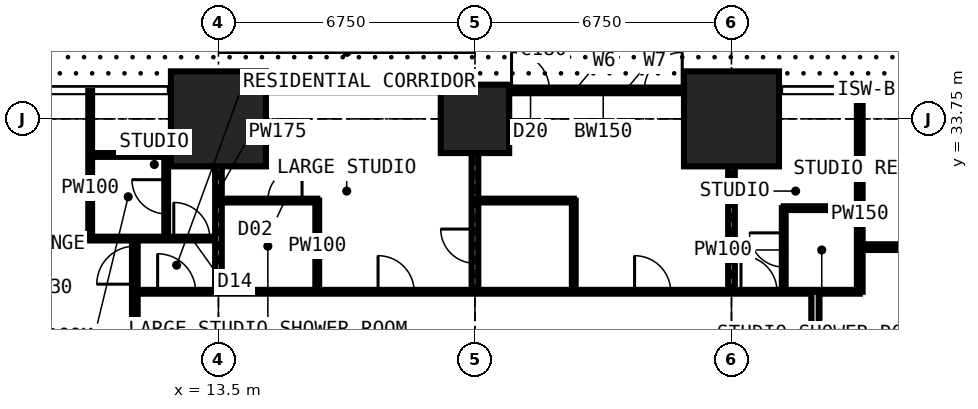
"""IFC4 building model, lengths in metres.
Left out: names, types, materials, properties, quantities, classifications, styles, units other than length and angle.
Written with IfcOpenShell. Run it as: python <this file> out.ifc"""

import sys

from ifc_helpers import new_model, si_unit, direction, frame, frame_2d, origin, origin_2d, place, context, subcontext, project, spatial, rectangle, extrude, element, fill, save


model = new_model("IFC4")
c1 = context("Model", 3, precision=1e-05, world=origin(), true_north=direction((0.0, 1.0)))
c2 = subcontext(c1, "Body", "Model", "MODEL_VIEW")
j1 = project(units=[si_unit("LENGTHUNIT", "METRE"), si_unit("PLANEANGLEUNIT", "RADIAN")], contexts=[c1])
p1 = place(None, origin())
s1 = spatial("IfcSite", under=j1, at=p1, CompositionType="ELEMENT")
p2 = place(p1, origin())
s2 = spatial("IfcBuilding", under=s1, at=p2, CompositionType="ELEMENT")
p3 = place(p2, frame((0.0, 0.0, 80.1)))
s3 = spatial("IfcBuildingStorey", under=s2, at=p3, CompositionType="ELEMENT", Elevation=80.1)
p4 = place(p3, frame((13.5, 33.75, 0.0), z_axis=(0.0, 0.0, 1.0), x_axis=(1.0, 0.0, 0.0)))
e1 = element("IfcColumn", 1, at=p4, inside=s3, PredefinedType="COLUMN", context=c2, shape_type="SweptSolid", body=[
    extrude(rectangle(XDim=2.5, YDim=2.5, at=origin_2d()), origin(), (0.0, 0.0, 1.0), 3.6),
])
p5 = place(p3, frame((20.25, 33.75, 0.0), z_axis=(0.0, 0.0, 1.0), x_axis=(1.0, 0.0, 0.0)))
e2 = element("IfcColumn", 2, at=p5, inside=s3, PredefinedType="COLUMN", context=c2, shape_type="SweptSolid", body=[
    extrude(rectangle(XDim=1.8, YDim=1.8, at=origin_2d()), origin(), (0.0, 0.0, 1.0), 3.6),
])
p6 = place(p3, frame((27.0, 33.75, 0.0), z_axis=(0.0, 0.0, 1.0), x_axis=(1.0, 0.0, 0.0)))
e3 = element("IfcColumn", 3, at=p6, inside=s3, PredefinedType="COLUMN", context=c2, shape_type="SweptSolid", body=[
    extrude(rectangle(XDim=2.5, YDim=2.5, at=origin_2d()), origin(), (0.0, 0.0, 1.0), 3.6),
])
p7 = place(p3, frame((20.25, 34.5, 0.0), z_axis=(0.0, 0.0, 1.0), x_axis=(1.0, 0.0, 0.0)))
e4 = element("IfcWall", 4, at=p7, inside=s3, PredefinedType="SOLIDWALL", context=c2, shape_type="SweptSolid", body=[
    extrude(rectangle(XDim=6.75, YDim=0.15, at=frame_2d((3.375, 0.0))), origin(), (0.0, 0.0, 1.0), 3.375),
])
p8 = place(p7, frame((0.962, 0.0, 0.0)))
e5 = element("IfcOpeningElement", 5, at=p8, cuts=e4, PredefinedType="OPENING", context=c2, shape_type="SweptSolid", body=[
    extrude(rectangle(XDim=1.0, YDim=2.2, at=frame_2d((0.5, 1.1))), frame((0.0, 0.085, 0.0), z_axis=(0.0, -1.0, 0.0), x_axis=(1.0, 0.0, 0.0)), (0.0, 0.0, 1.0), 0.17),
])
p9 = place(p7, frame((2.025, 0.0, 0.9)))
e6 = element("IfcOpeningElement", 6, at=p9, cuts=e4, PredefinedType="OPENING", context=c2, shape_type="SweptSolid", body=[
    extrude(rectangle(XDim=1.2, YDim=1.8, at=frame_2d((0.6, 0.9))), frame((0.0, 0.085, 0.0), z_axis=(0.0, -1.0, 0.0), x_axis=(1.0, 0.0, 0.0)), (0.0, 0.0, 1.0), 0.17),
])
p10 = place(p7, frame((4.454, 0.0, 0.0)))
e7 = element("IfcOpeningElement", 7, at=p10, cuts=e4, PredefinedType="OPENING", context=c2, shape_type="SweptSolid", body=[
    extrude(rectangle(XDim=1.0, YDim=2.2, at=frame_2d((0.5, 1.1))), frame((0.0, 0.085, 0.0), z_axis=(0.0, -1.0, 0.0), x_axis=(1.0, 0.0, 0.0)), (0.0, 0.0, 1.0), 0.17),
])
p11 = place(p7, frame((3.508, 0.0, 0.9)))
e8 = element("IfcOpeningElement", 8, at=p11, cuts=e4, PredefinedType="OPENING", context=c2, shape_type="SweptSolid", body=[
    extrude(rectangle(XDim=0.9, YDim=1.8, at=frame_2d((0.45, 0.9))), frame((0.0, 0.085, 0.0), z_axis=(0.0, -1.0, 0.0), x_axis=(1.0, 0.0, 0.0)), (0.0, 0.0, 1.0), 0.17),
])
p12 = place(p3, frame((10.125, 30.6, 0.0), z_axis=(0.0, 0.0, 1.0), x_axis=(0.0, 1.0, 0.0)))
e9 = element("IfcWall", 9, at=p12, inside=s3, PredefinedType="PARTITIONING", context=c2, shape_type="SweptSolid", body=[
    extrude(rectangle(XDim=3.884, YDim=0.1, at=frame_2d((1.942, 0.0))), origin(), (0.0, 0.0, 1.0), 3.375),
])
p13 = place(p3, frame((10.125, 30.6, 0.0), z_axis=(0.0, 0.0, 1.0), x_axis=(1.0, 0.0, 0.0)))
e10 = element("IfcWall", 10, at=p13, inside=s3, PredefinedType="PARTITIONING", context=c2, shape_type="SweptSolid", body=[
    extrude(rectangle(XDim=3.375, YDim=0.1, at=frame_2d((1.688, 0.0))), origin(), (0.0, 0.0, 1.0), 3.375),
])
p14 = place(p13, frame((2.2, 0.0, 0.0)))
e11 = element("IfcOpeningElement", 11, at=p14, cuts=e10, PredefinedType="OPENING", context=c2, shape_type="SweptSolid", body=[
    extrude(rectangle(XDim=0.95, YDim=2.2, at=frame_2d((0.475, 1.1))), frame((0.0, 0.06, 0.0), z_axis=(0.0, -1.0, 0.0), x_axis=(1.0, 0.0, 0.0)), (0.0, 0.0, 1.0), 0.12),
])
p15 = place(p3, frame((10.125, 32.8, 0.0), z_axis=(0.0, 0.0, 1.0), x_axis=(1.0, 0.0, 0.0)))
e12 = element("IfcWall", 12, at=p15, inside=s3, PredefinedType="PARTITIONING", context=c2, shape_type="SweptSolid", body=[
    extrude(rectangle(XDim=2.0, YDim=0.1, at=frame_2d((1.0, 0.0))), origin(), (0.0, 0.0, 1.0), 3.375),
])
p16 = place(p3, frame((11.3, 11.3, 0.0), z_axis=(0.0, 0.0, 1.0), x_axis=(0.0, 1.0, 0.0)))
e13 = element("IfcWall", 13, at=p16, inside=s3, PredefinedType="PARTITIONING", context=c2, shape_type="SweptSolid", body=[
    extrude(rectangle(XDim=19.3, YDim=0.15, at=frame_2d((9.65, 0.0))), origin(), (0.0, 0.0, 1.0), 3.375),
])
p17 = place(p16, frame((18.1, 0.0, 0.0)))
e14 = element("IfcOpeningElement", 14, at=p17, cuts=e13, PredefinedType="OPENING", context=c2, shape_type="SweptSolid", body=[
    extrude(rectangle(XDim=1.0, YDim=2.2, at=frame_2d((0.5, 1.1))), frame((0.0, 0.085, 0.0), z_axis=(0.0, -1.0, 0.0), x_axis=(1.0, 0.0, 0.0)), (0.0, 0.0, 1.0), 0.17),
])
p18 = place(p16, frame((10.137, 0.0, 0.0)))
e15 = element("IfcOpeningElement", 15, at=p18, cuts=e13, PredefinedType="OPENING", context=c2, shape_type="SweptSolid", body=[
    extrude(rectangle(XDim=1.0, YDim=2.2, at=frame_2d((0.5, 1.1))), frame((0.0, 0.085, 0.0), z_axis=(0.0, -1.0, 0.0), x_axis=(1.0, 0.0, 0.0)), (0.0, 0.0, 1.0), 0.17),
])
p19 = place(p3, frame((11.3, 29.2, 0.0), z_axis=(0.0, 0.0, 1.0), x_axis=(1.0, 0.0, 0.0)))
e16 = element("IfcWall", 16, at=p19, inside=s3, PredefinedType="PARTITIONING", context=c2, shape_type="SweptSolid", body=[
    extrude(rectangle(XDim=19.075, YDim=0.1, at=frame_2d((9.538, 0.0))), origin(), (0.0, 0.0, 1.0), 3.375),
])
p20 = place(p19, frame((6.4, 0.0, 0.0)))
e17 = element("IfcOpeningElement", 17, at=p20, cuts=e16, PredefinedType="OPENING", context=c2, shape_type="SweptSolid", body=[
    extrude(rectangle(XDim=0.95, YDim=2.2, at=frame_2d((0.475, 1.1))), frame((0.0, 0.06, 0.0), z_axis=(0.0, -1.0, 0.0), x_axis=(1.0, 0.0, 0.0)), (0.0, 0.0, 1.0), 0.12),
])
p21 = place(p19, frame((13.15, 0.0, 0.0)))
e18 = element("IfcOpeningElement", 18, at=p21, cuts=e16, PredefinedType="OPENING", context=c2, shape_type="SweptSolid", body=[
    extrude(rectangle(XDim=0.95, YDim=2.2, at=frame_2d((0.475, 1.1))), frame((0.0, 0.06, 0.0), z_axis=(0.0, -1.0, 0.0), x_axis=(1.0, 0.0, 0.0)), (0.0, 0.0, 1.0), 0.12),
])
p22 = place(p19, frame((15.95, 0.0, 0.0)))
e19 = element("IfcOpeningElement", 19, at=p22, cuts=e16, PredefinedType="OPENING", context=c2, shape_type="SweptSolid", body=[
    extrude(rectangle(XDim=0.95, YDim=2.2, at=frame_2d((0.475, 1.1))), frame((0.0, 0.06, 0.0), z_axis=(0.0, -1.0, 0.0), x_axis=(1.0, 0.0, 0.0)), (0.0, 0.0, 1.0), 0.12),
])
p23 = place(p19, frame((0.6, 0.0, 0.0)))
e20 = element("IfcOpeningElement", 20, at=p23, cuts=e16, PredefinedType="OPENING", context=c2, shape_type="SweptSolid", body=[
    extrude(rectangle(XDim=1.0, YDim=2.2, at=frame_2d((0.5, 1.1))), frame((0.0, 0.06, 0.0), z_axis=(0.0, -1.0, 0.0), x_axis=(1.0, 0.0, 0.0)), (0.0, 0.0, 1.0), 0.12),
])
p24 = place(p3, frame((12.125, 30.6, 0.0), z_axis=(0.0, 0.0, 1.0), x_axis=(0.0, 1.0, 0.0)))
e21 = element("IfcWall", 21, at=p24, inside=s3, PredefinedType="PARTITIONING", context=c2, shape_type="SweptSolid", body=[
    extrude(rectangle(XDim=2.2, YDim=0.1, at=frame_2d((1.1, 0.0))), origin(), (0.0, 0.0, 1.0), 3.375),
])
p25 = place(p24, frame((0.65, 0.0, 0.0)))
e22 = element("IfcOpeningElement", 22, at=p25, cuts=e21, PredefinedType="OPENING", context=c2, shape_type="SweptSolid", body=[
    extrude(rectangle(XDim=0.9, YDim=2.2, at=frame_2d((0.45, 1.1))), frame((0.0, 0.06, 0.0), z_axis=(0.0, -1.0, 0.0), x_axis=(1.0, 0.0, 0.0)), (0.0, 0.0, 1.0), 0.12),
])
p26 = place(p3, frame((13.5, 29.2, 0.0), z_axis=(0.0, 0.0, 1.0), x_axis=(0.0, 1.0, 0.0)))
e23 = element("IfcWall", 23, at=p26, inside=s3, PredefinedType="PARTITIONING", context=c2, shape_type="SweptSolid", body=[
    extrude(rectangle(XDim=5.284, YDim=0.175, at=frame_2d((2.642, 0.0))), origin(), (0.0, 0.0, 1.0), 2.806),
])
p27 = place(p3, frame((13.5, 31.6, 0.0), z_axis=(0.0, 0.0, 1.0), x_axis=(1.0, 0.0, 0.0)))
e24 = element("IfcWall", 24, at=p27, inside=s3, PredefinedType="PARTITIONING", context=c2, shape_type="SweptSolid", body=[
    extrude(rectangle(XDim=2.6, YDim=0.1, at=frame_2d((1.3, 0.0))), origin(), (0.0, 0.0, 1.0), 3.375),
])
p28 = place(p27, frame((1.3, 0.0, 0.0)))
e25 = element("IfcOpeningElement", 25, at=p28, cuts=e24, PredefinedType="OPENING", context=c2, shape_type="SweptSolid", body=[
    extrude(rectangle(XDim=0.9, YDim=2.2, at=frame_2d((0.45, 1.1))), frame((0.0, 0.06, 0.0), z_axis=(0.0, -1.0, 0.0), x_axis=(1.0, 0.0, 0.0)), (0.0, 0.0, 1.0), 0.12),
])
p29 = place(p3, frame((16.1, 29.2, 0.0), z_axis=(0.0, 0.0, 1.0), x_axis=(0.0, 1.0, 0.0)))
e26 = element("IfcWall", 26, at=p29, inside=s3, PredefinedType="PARTITIONING", context=c2, shape_type="SweptSolid", body=[
    extrude(rectangle(XDim=2.4, YDim=0.1, at=frame_2d((1.2, 0.0))), origin(), (0.0, 0.0, 1.0), 3.375),
])
p30 = place(p3, frame((20.25, 29.2, 0.0), z_axis=(0.0, 0.0, 1.0), x_axis=(0.0, 1.0, 0.0)))
e27 = element("IfcWall", 27, at=p30, inside=s3, PredefinedType="PARTITIONING", context=c2, shape_type="SweptSolid", body=[
    extrude(rectangle(XDim=5.284, YDim=0.175, at=frame_2d((2.642, 0.0))), origin(), (0.0, 0.0, 1.0), 2.61),
])
p31 = place(p30, frame((0.75, 0.0, 0.0)))
e28 = element("IfcOpeningElement", 28, at=p31, cuts=e27, PredefinedType="OPENING", context=c2, shape_type="SweptSolid", body=[
    extrude(rectangle(XDim=0.9, YDim=2.2, at=frame_2d((0.45, 1.1))), frame((0.0, 0.097, 0.0), z_axis=(0.0, -1.0, 0.0), x_axis=(1.0, 0.0, 0.0)), (0.0, 0.0, 1.0), 0.195),
])
p32 = place(p3, frame((20.25, 31.6, 0.0), z_axis=(0.0, 0.0, 1.0), x_axis=(1.0, 0.0, 0.0)))
e29 = element("IfcWall", 29, at=p32, inside=s3, PredefinedType="PARTITIONING", context=c2, shape_type="SweptSolid", body=[
    extrude(rectangle(XDim=2.6, YDim=0.1, at=frame_2d((1.3, 0.0))), origin(), (0.0, 0.0, 1.0), 3.375),
])
p33 = place(p3, frame((22.85, 29.2, 0.0), z_axis=(0.0, 0.0, 1.0), x_axis=(0.0, 1.0, 0.0)))
e30 = element("IfcWall", 30, at=p33, inside=s3, PredefinedType="PARTITIONING", context=c2, shape_type="SweptSolid", body=[
    extrude(rectangle(XDim=2.4, YDim=0.1, at=frame_2d((1.2, 0.0))), origin(), (0.0, 0.0, 1.0), 3.375),
])
p34 = place(p3, frame((27.0, 29.2, 0.0), z_axis=(0.0, 0.0, 1.0), x_axis=(0.0, 1.0, 0.0)))
e31 = element("IfcWall", 31, at=p34, inside=s3, PredefinedType="PARTITIONING", context=c2, shape_type="SweptSolid", body=[
    extrude(rectangle(XDim=5.284, YDim=0.175, at=frame_2d((2.642, 0.0))), origin(), (0.0, 0.0, 1.0), 2.61),
])
p35 = place(p3, frame((28.375, 29.2, 0.0), z_axis=(0.0, 0.0, 1.0), x_axis=(0.0, 1.0, 0.0)))
e32 = element("IfcWall", 32, at=p35, inside=s3, PredefinedType="PARTITIONING", context=c2, shape_type="SweptSolid", body=[
    extrude(rectangle(XDim=2.2, YDim=0.1, at=frame_2d((1.1, 0.0))), origin(), (0.0, 0.0, 1.0), 3.375),
])
p36 = place(p35, frame((0.65, 0.0, 0.0)))
e33 = element("IfcOpeningElement", 33, at=p36, cuts=e32, PredefinedType="OPENING", context=c2, shape_type="SweptSolid", body=[
    extrude(rectangle(XDim=0.9, YDim=2.2, at=frame_2d((0.45, 1.1))), frame((0.0, 0.06, 0.0), z_axis=(0.0, -1.0, 0.0), x_axis=(1.0, 0.0, 0.0)), (0.0, 0.0, 1.0), 0.12),
])
p37 = place(p3, frame((28.375, 31.4, 0.0), z_axis=(0.0, 0.0, 1.0), x_axis=(1.0, 0.0, 0.0)))
e34 = element("IfcWall", 34, at=p37, inside=s3, PredefinedType="PARTITIONING", context=c2, shape_type="SweptSolid", body=[
    extrude(rectangle(XDim=2.0, YDim=0.1, at=frame_2d((1.0, 0.0))), origin(), (0.0, 0.0, 1.0), 3.375),
])
p38 = place(p3, frame((29.2, 11.3, 0.0), z_axis=(0.0, 0.0, 1.0), x_axis=(0.0, 1.0, 0.0)))
e35 = element("IfcWall", 35, at=p38, inside=s3, PredefinedType="PARTITIONING", context=c2, shape_type="SweptSolid", body=[
    extrude(rectangle(XDim=17.9, YDim=0.2, at=frame_2d((8.95, 0.0))), origin(), (0.0, 0.0, 1.0), 3.375),
])
p39 = place(p38, frame((8.35, 0.0, 0.0)))
e36 = element("IfcOpeningElement", 36, at=p39, cuts=e35, PredefinedType="OPENING", context=c2, shape_type="SweptSolid", body=[
    extrude(rectangle(XDim=1.2, YDim=2.2, at=frame_2d((0.6, 1.1))), frame((0.0, 0.11, 0.0), z_axis=(0.0, -1.0, 0.0), x_axis=(1.0, 0.0, 0.0)), (0.0, 0.0, 1.0), 0.22),
])
p40 = place(p3, frame((30.375, 29.2, 0.0), z_axis=(0.0, 0.0, 1.0), x_axis=(0.0, 1.0, 0.0)))
e37 = element("IfcWall", 37, at=p40, inside=s3, PredefinedType="PARTITIONING", context=c2, shape_type="SweptSolid", body=[
    extrude(rectangle(XDim=5.284, YDim=0.15, at=frame_2d((2.642, 0.0))), origin(), (0.0, 0.0, 1.0), 3.375),
])
p41 = place(p3, frame((30.375, 30.375, 0.0), z_axis=(0.0, 0.0, 1.0), x_axis=(1.0, 0.0, 0.0)))
e38 = element("IfcWall", 38, at=p41, inside=s3, PredefinedType="PARTITIONING", context=c2, shape_type="SweptSolid", body=[
    extrude(rectangle(XDim=7.35, YDim=0.15, at=frame_2d((3.675, 0.0))), origin(), (0.0, 0.0, 1.0), 2.877),
])
p42 = place(p41, frame((5.125, 0.0, 0.0)))
e39 = element("IfcOpeningElement", 39, at=p42, cuts=e38, PredefinedType="OPENING", context=c2, shape_type="SweptSolid", body=[
    extrude(rectangle(XDim=1.0, YDim=2.2, at=frame_2d((0.5, 1.1))), frame((0.0, 0.085, 0.0), z_axis=(0.0, -1.0, 0.0), x_axis=(1.0, 0.0, 0.0)), (0.0, 0.0, 1.0), 0.17),
])
p43 = place(p8, origin())
e40 = element("IfcDoor", 40, at=p43, inside=s3, OperationType="SINGLE_SWING_LEFT", PredefinedType="DOOR", context=c2, shape_type="SweptSolid", body=[
    extrude(rectangle(XDim=1.0, YDim=2.2, at=frame_2d((0.5, 1.1))), frame((0.0, 0.025, 0.0), z_axis=(0.0, -1.0, 0.0), x_axis=(1.0, 0.0, 0.0)), (0.0, 0.0, 1.0), 0.05),
])
fill(e5, e40)
p44 = place(p9, origin())
e41 = element("IfcWindow", 41, at=p44, inside=s3, PartitioningType="SINGLE_PANEL", PredefinedType="WINDOW", context=c2, shape_type="SweptSolid", body=[
    extrude(rectangle(XDim=1.2, YDim=1.8, at=frame_2d((0.6, 0.9))), frame((0.0, 0.03, 0.0), z_axis=(0.0, -1.0, 0.0), x_axis=(1.0, 0.0, 0.0)), (0.0, 0.0, 1.0), 0.06),
])
fill(e6, e41)
p45 = place(p10, origin())
e42 = element("IfcDoor", 42, at=p45, inside=s3, OperationType="SINGLE_SWING_RIGHT", PredefinedType="DOOR", context=c2, shape_type="SweptSolid", body=[
    extrude(rectangle(XDim=1.0, YDim=2.2, at=frame_2d((0.5, 1.1))), frame((0.0, 0.025, 0.0), z_axis=(0.0, -1.0, 0.0), x_axis=(1.0, 0.0, 0.0)), (0.0, 0.0, 1.0), 0.05),
])
fill(e7, e42)
p46 = place(p11, origin())
e43 = element("IfcWindow", 43, at=p46, inside=s3, PartitioningType="SINGLE_PANEL", PredefinedType="WINDOW", context=c2, shape_type="SweptSolid", body=[
    extrude(rectangle(XDim=0.9, YDim=1.8, at=frame_2d((0.45, 0.9))), frame((0.0, 0.03, 0.0), z_axis=(0.0, -1.0, 0.0), x_axis=(1.0, 0.0, 0.0)), (0.0, 0.0, 1.0), 0.06),
])
fill(e8, e43)
p47 = place(p20, origin())
e44 = element("IfcDoor", 44, at=p47, inside=s3, OperationType="SINGLE_SWING_LEFT", PredefinedType="DOOR", context=c2, shape_type="SweptSolid", body=[
    extrude(rectangle(XDim=0.95, YDim=2.2, at=frame_2d((0.475, 1.1))), frame((0.0, 0.025, 0.0), z_axis=(0.0, -1.0, 0.0), x_axis=(1.0, 0.0, 0.0)), (0.0, 0.0, 1.0), 0.05),
])
fill(e17, e44)
p48 = place(p28, origin())
e45 = element("IfcDoor", 45, at=p48, inside=s3, OperationType="SINGLE_SWING_RIGHT", PredefinedType="DOOR", context=c2, shape_type="SweptSolid", body=[
    extrude(rectangle(XDim=0.9, YDim=2.2, at=frame_2d((0.45, 1.1))), frame((0.0, 0.025, 0.0), z_axis=(0.0, -1.0, 0.0), x_axis=(1.0, 0.0, 0.0)), (0.0, 0.0, 1.0), 0.05),
])
fill(e25, e45)
p49 = place(p21, origin())
e46 = element("IfcDoor", 46, at=p49, inside=s3, OperationType="SINGLE_SWING_LEFT", PredefinedType="DOOR", context=c2, shape_type="SweptSolid", body=[
    extrude(rectangle(XDim=0.95, YDim=2.2, at=frame_2d((0.475, 1.1))), frame((0.0, 0.025, 0.0), z_axis=(0.0, -1.0, 0.0), x_axis=(1.0, 0.0, 0.0)), (0.0, 0.0, 1.0), 0.05),
])
fill(e18, e46)
p50 = place(p31, origin())
e47 = element("IfcDoor", 47, at=p50, inside=s3, OperationType="SINGLE_SWING_RIGHT", PredefinedType="DOOR", context=c2, shape_type="SweptSolid", body=[
    extrude(rectangle(XDim=0.9, YDim=2.2, at=frame_2d((0.45, 1.1))), frame((0.0, 0.025, 0.0), z_axis=(0.0, -1.0, 0.0), x_axis=(1.0, 0.0, 0.0)), (0.0, 0.0, 1.0), 0.05),
])
fill(e28, e47)
p51 = place(p14, origin())
e48 = element("IfcDoor", 48, at=p51, inside=s3, OperationType="SINGLE_SWING_LEFT", PredefinedType="DOOR", context=c2, shape_type="SweptSolid", body=[
    extrude(rectangle(XDim=0.95, YDim=2.2, at=frame_2d((0.475, 1.1))), frame((0.0, 0.025, 0.0), z_axis=(0.0, -1.0, 0.0), x_axis=(1.0, 0.0, 0.0)), (0.0, 0.0, 1.0), 0.05),
])
fill(e11, e48)
p52 = place(p25, origin())
e49 = element("IfcDoor", 49, at=p52, inside=s3, OperationType="SINGLE_SWING_RIGHT", PredefinedType="DOOR", context=c2, shape_type="SweptSolid", body=[
    extrude(rectangle(XDim=0.9, YDim=2.2, at=frame_2d((0.45, 1.1))), frame((0.0, 0.025, 0.0), z_axis=(0.0, -1.0, 0.0), x_axis=(1.0, 0.0, 0.0)), (0.0, 0.0, 1.0), 0.05),
])
fill(e22, e49)
p53 = place(p22, origin())
e50 = element("IfcDoor", 50, at=p53, inside=s3, OperationType="SINGLE_SWING_LEFT", PredefinedType="DOOR", context=c2, shape_type="SweptSolid", body=[
    extrude(rectangle(XDim=0.95, YDim=2.2, at=frame_2d((0.475, 1.1))), frame((0.0, 0.025, 0.0), z_axis=(0.0, -1.0, 0.0), x_axis=(1.0, 0.0, 0.0)), (0.0, 0.0, 1.0), 0.05),
])
fill(e19, e50)
p54 = place(p36, origin())
e51 = element("IfcDoor", 51, at=p54, inside=s3, OperationType="SINGLE_SWING_RIGHT", PredefinedType="DOOR", context=c2, shape_type="SweptSolid", body=[
    extrude(rectangle(XDim=0.9, YDim=2.2, at=frame_2d((0.45, 1.1))), frame((0.0, 0.025, 0.0), z_axis=(0.0, -1.0, 0.0), x_axis=(1.0, 0.0, 0.0)), (0.0, 0.0, 1.0), 0.05),
])
fill(e33, e51)
p55 = place(p23, origin())
e52 = element("IfcDoor", 52, at=p55, inside=s3, OperationType="SINGLE_SWING_LEFT", PredefinedType="DOOR", context=c2, shape_type="SweptSolid", body=[
    extrude(rectangle(XDim=1.0, YDim=2.2, at=frame_2d((0.5, 1.1))), frame((0.0, 0.025, 0.0), z_axis=(0.0, -1.0, 0.0), x_axis=(1.0, 0.0, 0.0)), (0.0, 0.0, 1.0), 0.05),
])
fill(e20, e52)
p56 = place(p17, origin())
e53 = element("IfcDoor", 53, at=p56, inside=s3, OperationType="SINGLE_SWING_LEFT", PredefinedType="DOOR", context=c2, shape_type="SweptSolid", body=[
    extrude(rectangle(XDim=1.0, YDim=2.2, at=frame_2d((0.5, 1.1))), frame((0.0, 0.025, 0.0), z_axis=(0.0, -1.0, 0.0), x_axis=(1.0, 0.0, 0.0)), (0.0, 0.0, 1.0), 0.05),
])
fill(e14, e53)
save(model, sys.argv[1])
